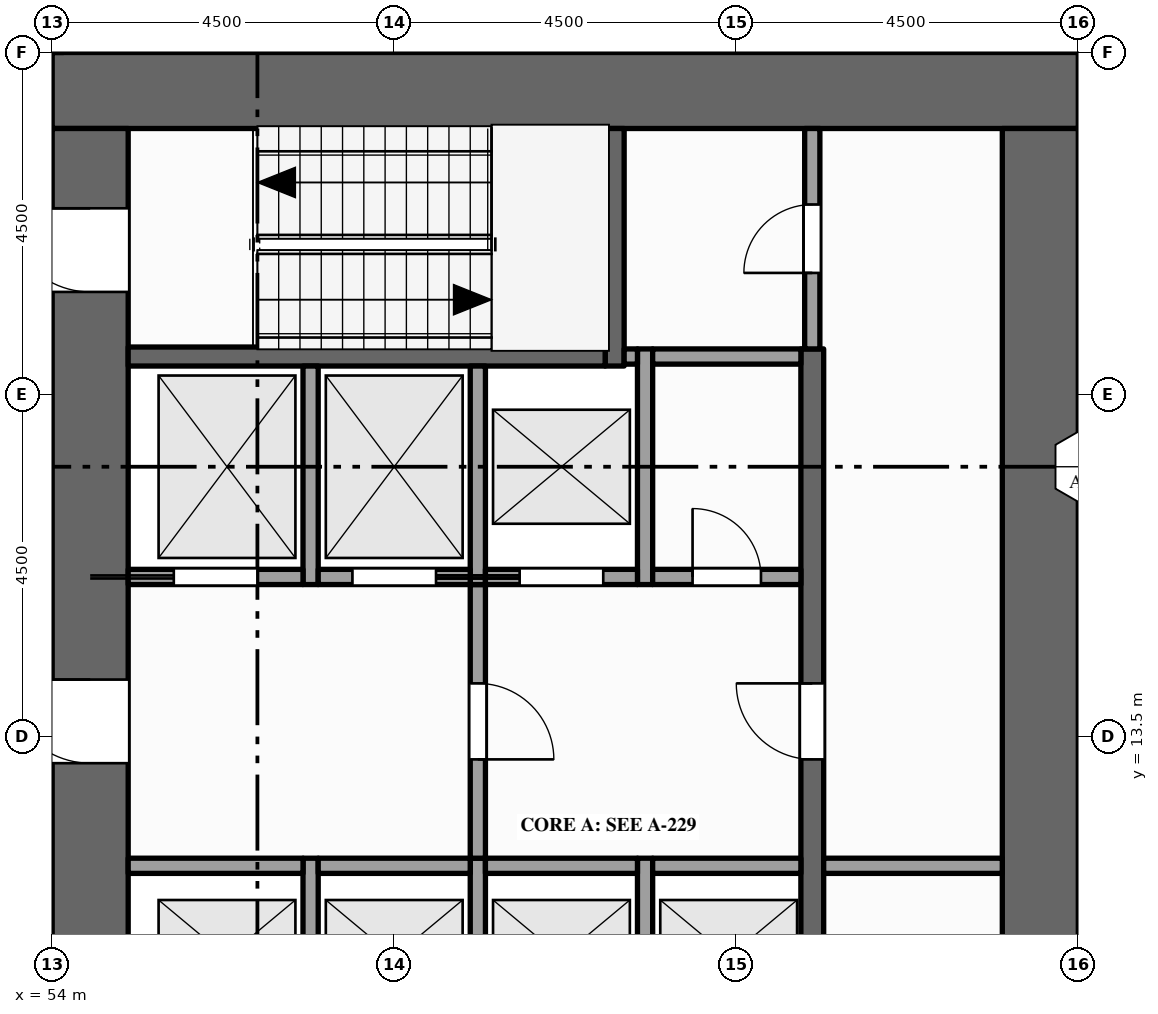
"""IFC4 building model, lengths in metres.
Left out: names, types, materials, properties, quantities, classifications, styles, units other than length and angle.
Written with IfcOpenShell. Run it as: python <this file> out.ifc"""

import sys

from ifc_helpers import new_model, si_unit, direction, frame, frame_2d, origin, place, context, subcontext, project, spatial, rectangle, extrude, element, fill, save


model = new_model("IFC4")
c1 = context("Model", 3, precision=1e-05, world=origin(), true_north=direction((0.0, 1.0)))
c2 = subcontext(c1, "Body", "Model", "MODEL_VIEW")
j1 = project(units=[si_unit("LENGTHUNIT", "METRE"), si_unit("PLANEANGLEUNIT", "RADIAN")], contexts=[c1])
p1 = place(None, origin())
s1 = spatial("IfcSite", under=j1, at=p1, CompositionType="ELEMENT")
p2 = place(p1, origin())
s2 = spatial("IfcBuilding", under=s1, at=p2, CompositionType="ELEMENT")
p3 = place(p2, frame((0.0, 0.0, 155.0)))
s3 = spatial("IfcBuildingStorey", under=s2, at=p3, CompositionType="ELEMENT", Elevation=155.0)
p4 = place(p3, frame((54.0, 22.0, -0.15), z_axis=(0.0, 0.0, 1.0), x_axis=(1.0, 0.0, 0.0)))
e1 = element("IfcWall", 1, at=p4, inside=s3, PredefinedType="SHEAR", context=c2, shape_type="SweptSolid", body=[
    extrude(rectangle(XDim=13.5, YDim=1.0, at=frame_2d((6.75, 0.0))), origin(), (0.0, 0.0, 1.0), 4.0),
])
p5 = place(p3, frame((54.5, 1.0, -0.15), z_axis=(0.0, 0.0, 1.0), x_axis=(0.0, 1.0, 0.0)))
e2 = element("IfcWall", 2, at=p5, inside=s3, PredefinedType="SHEAR", context=c2, shape_type="SweptSolid", body=[
    extrude(rectangle(XDim=20.5, YDim=1.0, at=frame_2d((10.25, 0.0))), origin(), (0.0, 0.0, 1.0), 4.0),
])
p6 = place(p5, frame((6.1, 0.0, 0.15)))
e3 = element("IfcOpeningElement", 3, at=p6, cuts=e2, PredefinedType="OPENING", context=c2, shape_type="SweptSolid", body=[
    extrude(rectangle(XDim=1.8, YDim=2.1, at=frame_2d((0.9, 1.05))), frame((0.0, 0.51, 0.0), z_axis=(0.0, -1.0, 0.0), x_axis=(1.0, 0.0, 0.0)), (0.0, 0.0, 1.0), 1.02),
])
p7 = place(p5, frame((12.15, 0.0, 0.15)))
e4 = element("IfcOpeningElement", 4, at=p7, cuts=e2, PredefinedType="OPENING", context=c2, shape_type="SweptSolid", body=[
    extrude(rectangle(XDim=1.1, YDim=2.1, at=frame_2d((0.55, 1.05))), frame((0.0, 0.51, 0.0), z_axis=(0.0, -1.0, 0.0), x_axis=(1.0, 0.0, 0.0)), (0.0, 0.0, 1.0), 1.02),
])
p8 = place(p5, frame((1.15, 0.0, 0.15)))
e5 = element("IfcOpeningElement", 5, at=p8, cuts=e2, PredefinedType="OPENING", context=c2, shape_type="SweptSolid", body=[
    extrude(rectangle(XDim=1.1, YDim=2.1, at=frame_2d((0.55, 1.05))), frame((0.0, 0.51, 0.0), z_axis=(0.0, -1.0, 0.0), x_axis=(1.0, 0.0, 0.0)), (0.0, 0.0, 1.0), 1.02),
])
p9 = place(p5, frame((18.35, 0.0, 0.15)))
e6 = element("IfcOpeningElement", 6, at=p9, cuts=e2, PredefinedType="OPENING", context=c2, shape_type="SweptSolid", body=[
    extrude(rectangle(XDim=1.1, YDim=2.1, at=frame_2d((0.55, 1.05))), frame((0.0, 0.51, 0.0), z_axis=(0.0, -1.0, 0.0), x_axis=(1.0, 0.0, 0.0)), (0.0, 0.0, 1.0), 1.02),
])
p10 = place(p3, frame((67.0, 1.0, -0.15), z_axis=(0.0, 0.0, 1.0), x_axis=(0.0, 1.0, 0.0)))
e7 = element("IfcWall", 7, at=p10, inside=s3, PredefinedType="SHEAR", context=c2, shape_type="SweptSolid", body=[
    extrude(rectangle(XDim=20.5, YDim=1.0, at=frame_2d((10.25, 0.0))), origin(), (0.0, 0.0, 1.0), 4.0),
])
p11 = place(p3, frame((54.0, 22.5, 0.0), z_axis=(0.0, 0.0, 1.0), x_axis=(0.0, 1.0, 0.0)))
e8 = element("IfcWall", 8, at=p11, inside=s3, PredefinedType="STANDARD", context=c2, shape_type="SweptSolid", body=[
    extrude(rectangle(XDim=1.05, YDim=0.3, at=frame_2d((0.525, 0.0))), origin(), (0.0, 0.0, 1.0), 3.149),
])
p12 = place(p3, frame((57.4, 9.3, 0.0), z_axis=(0.0, 0.0, 1.0), x_axis=(0.0, 1.0, 0.0)))
e9 = element("IfcWall", 9, at=p12, inside=s3, PredefinedType="SOLIDWALL", context=c2, shape_type="SweptSolid", body=[
    extrude(rectangle(XDim=2.6, YDim=0.2, at=frame_2d((1.3, 0.0))), origin(), (0.0, 0.0, 1.0), 3.85),
])
p13 = place(p3, frame((57.4, 15.5, 0.0), z_axis=(0.0, 0.0, 1.0), x_axis=(0.0, 1.0, 0.0)))
e10 = element("IfcWall", 10, at=p13, inside=s3, PredefinedType="SOLIDWALL", context=c2, shape_type="SweptSolid", body=[
    extrude(rectangle(XDim=2.875, YDim=0.2, at=frame_2d((1.438, 0.0))), origin(), (0.0, 0.0, 1.0), 3.85),
])
p14 = place(p3, frame((59.6, 9.3, 0.0), z_axis=(0.0, 0.0, 1.0), x_axis=(0.0, 1.0, 0.0)))
e11 = element("IfcWall", 11, at=p14, inside=s3, PredefinedType="SOLIDWALL", context=c2, shape_type="SweptSolid", body=[
    extrude(rectangle(XDim=2.6, YDim=0.2, at=frame_2d((1.3, 0.0))), origin(), (0.0, 0.0, 1.0), 3.85),
])
p15 = place(p3, frame((59.6, 11.9, 0.0), z_axis=(0.0, 0.0, 1.0), x_axis=(0.0, 1.0, 0.0)))
e12 = element("IfcWall", 12, at=p15, inside=s3, PredefinedType="PARTITIONING", context=c2, shape_type="SweptSolid", body=[
    extrude(rectangle(XDim=3.6, YDim=0.2, at=frame_2d((1.8, 0.0))), origin(), (0.0, 0.0, 1.0), 3.85),
])
p16 = place(p15, frame((1.3, 0.0, 0.0)))
e13 = element("IfcOpeningElement", 13, at=p16, cuts=e12, PredefinedType="OPENING", context=c2, shape_type="SweptSolid", body=[
    extrude(rectangle(XDim=1.0, YDim=2.1, at=frame_2d((0.5, 1.05))), frame((0.0, 0.11, 0.0), z_axis=(0.0, -1.0, 0.0), x_axis=(1.0, 0.0, 0.0)), (0.0, 0.0, 1.0), 0.22),
])
p17 = place(p3, frame((59.6, 15.5, 0.0), z_axis=(0.0, 0.0, 1.0), x_axis=(0.0, 1.0, 0.0)))
e14 = element("IfcWall", 14, at=p17, inside=s3, PredefinedType="SOLIDWALL", context=c2, shape_type="SweptSolid", body=[
    extrude(rectangle(XDim=2.875, YDim=0.2, at=frame_2d((1.438, 0.0))), origin(), (0.0, 0.0, 1.0), 3.85),
])
p18 = place(p3, frame((61.4, 18.375, 0.0), z_axis=(0.0, 0.0, 1.0), x_axis=(0.0, 1.0, 0.0)))
e15 = element("IfcWall", 15, at=p18, inside=s3, PredefinedType="SHEAR", context=c2, shape_type="SweptSolid", body=[
    extrude(rectangle(XDim=3.125, YDim=0.25, at=frame_2d((1.562, 0.0))), origin(), (0.0, 0.0, 1.0), 3.85),
])
p19 = place(p3, frame((61.8, 9.3, 0.0), z_axis=(0.0, 0.0, 1.0), x_axis=(0.0, 1.0, 0.0)))
e16 = element("IfcWall", 16, at=p19, inside=s3, PredefinedType="SOLIDWALL", context=c2, shape_type="SweptSolid", body=[
    extrude(rectangle(XDim=2.6, YDim=0.2, at=frame_2d((1.3, 0.0))), origin(), (0.0, 0.0, 1.0), 3.85),
])
p20 = place(p3, frame((61.8, 15.5, 0.0), z_axis=(0.0, 0.0, 1.0), x_axis=(0.0, 1.0, 0.0)))
e17 = element("IfcWall", 17, at=p20, inside=s3, PredefinedType="SOLIDWALL", context=c2, shape_type="SweptSolid", body=[
    extrude(rectangle(XDim=3.1, YDim=0.2, at=frame_2d((1.55, 0.0))), origin(), (0.0, 0.0, 1.0), 3.85),
])
p21 = place(p3, frame((64.0, 4.1, 0.0), z_axis=(0.0, 0.0, 1.0), x_axis=(0.0, 1.0, 0.0)))
e18 = element("IfcWall", 18, at=p21, inside=s3, PredefinedType="SHEAR", context=c2, shape_type="SweptSolid", body=[
    extrude(rectangle(XDim=14.5, YDim=0.3, at=frame_2d((7.25, 0.0))), origin(), (0.0, 0.0, 1.0), 3.85),
])
p22 = place(p21, frame((3.4, 0.0, 0.0)))
e19 = element("IfcOpeningElement", 19, at=p22, cuts=e18, PredefinedType="OPENING", context=c2, shape_type="SweptSolid", body=[
    extrude(rectangle(XDim=1.0, YDim=2.1, at=frame_2d((0.5, 1.05))), frame((0.0, 0.16, 0.0), z_axis=(0.0, -1.0, 0.0), x_axis=(1.0, 0.0, 0.0)), (0.0, 0.0, 1.0), 0.32),
])
p23 = place(p21, frame((9.1, 0.0, 0.0)))
e20 = element("IfcOpeningElement", 20, at=p23, cuts=e18, PredefinedType="OPENING", context=c2, shape_type="SweptSolid", body=[
    extrude(rectangle(XDim=1.0, YDim=2.1, at=frame_2d((0.5, 1.05))), frame((0.0, 0.16, 0.0), z_axis=(0.0, -1.0, 0.0), x_axis=(1.0, 0.0, 0.0)), (0.0, 0.0, 1.0), 0.32),
])
p24 = place(p3, frame((64.0, 18.6, 0.0), z_axis=(0.0, 0.0, 1.0), x_axis=(0.0, 1.0, 0.0)))
e21 = element("IfcWall", 21, at=p24, inside=s3, PredefinedType="PARTITIONING", context=c2, shape_type="SweptSolid", body=[
    extrude(rectangle(XDim=2.9, YDim=0.2, at=frame_2d((1.45, 0.0))), origin(), (0.0, 0.0, 1.0), 3.85),
])
p25 = place(p24, frame((1.0, 0.0, 0.0)))
e22 = element("IfcOpeningElement", 22, at=p25, cuts=e21, PredefinedType="OPENING", context=c2, shape_type="SweptSolid", body=[
    extrude(rectangle(XDim=0.9, YDim=2.1, at=frame_2d((0.45, 1.05))), frame((0.0, 0.11, 0.0), z_axis=(0.0, -1.0, 0.0), x_axis=(1.0, 0.0, 0.0)), (0.0, 0.0, 1.0), 0.22),
])
p26 = place(p3, frame((55.0, 11.8, 0.0), z_axis=(0.0, 0.0, 1.0), x_axis=(1.0, 0.0, 0.0)))
e23 = element("IfcWall", 23, at=p26, inside=s3, PredefinedType="SOLIDWALL", context=c2, shape_type="SweptSolid", body=[
    extrude(rectangle(XDim=2.3, YDim=0.2, at=frame_2d((1.15, 0.0))), origin(), (0.0, 0.0, 1.0), 3.85),
])
for number, where, z_axis, x_axis in (
    (24, (57.5, 11.8, 0.0), (0.0, 0.0, 1.0), (1.0, 0.0, 0.0)),
    (25, (59.7, 11.8, 0.0), (0.0, 0.0, 1.0), (1.0, 0.0, 0.0)),
):
    element("IfcWall", number, at=place(p3, frame(where, z_axis=z_axis, x_axis=x_axis)), inside=s3, PredefinedType="SOLIDWALL", context=c2, shape_type="SweptSolid", body=[
        extrude(rectangle(XDim=2.0, YDim=0.2, at=frame_2d((1.0, 0.0))), origin(), (0.0, 0.0, 1.0), 3.85),
    ])
p27 = place(p3, frame((61.9, 11.8, 0.0), z_axis=(0.0, 0.0, 1.0), x_axis=(1.0, 0.0, 0.0)))
e26 = element("IfcWall", 26, at=p27, inside=s3, PredefinedType="SOLIDWALL", context=c2, shape_type="SweptSolid", body=[
    extrude(rectangle(XDim=1.95, YDim=0.2, at=frame_2d((0.975, 0.0))), origin(), (0.0, 0.0, 1.0), 3.85),
])
p28 = place(p3, frame((64.15, 11.8, 0.0), z_axis=(0.0, 0.0, 1.0), x_axis=(1.0, 0.0, 0.0)))
e27 = element("IfcWall", 27, at=p28, inside=s3, PredefinedType="PARTITIONING", context=c2, shape_type="SweptSolid", body=[
    extrude(rectangle(XDim=2.35, YDim=0.2, at=frame_2d((1.175, 0.0))), origin(), (0.0, 0.0, 1.0), 3.85),
])
p29 = place(p3, frame((55.0, 15.6, 0.0), z_axis=(0.0, 0.0, 1.0), x_axis=(1.0, 0.0, 0.0)))
e28 = element("IfcWall", 28, at=p29, inside=s3, PredefinedType="SOLIDWALL", context=c2, shape_type="SweptSolid", body=[
    extrude(rectangle(XDim=2.3, YDim=0.2, at=frame_2d((1.15, 0.0))), origin(), (0.0, 0.0, 1.0), 3.85),
])
p30 = place(p29, frame((0.6, 0.0, 0.012)))
e29 = element("IfcOpeningElement", 29, at=p30, cuts=e28, PredefinedType="OPENING", context=c2, shape_type="SweptSolid", body=[
    extrude(rectangle(XDim=1.1, YDim=2.1, at=frame_2d((0.55, 1.05))), frame((0.0, 0.11, 0.0), z_axis=(0.0, -1.0, 0.0), x_axis=(1.0, 0.0, 0.0)), (0.0, 0.0, 1.0), 0.22),
])
p31 = place(p3, frame((57.5, 15.6, 0.0), z_axis=(0.0, 0.0, 1.0), x_axis=(1.0, 0.0, 0.0)))
e30 = element("IfcWall", 30, at=p31, inside=s3, PredefinedType="SOLIDWALL", context=c2, shape_type="SweptSolid", body=[
    extrude(rectangle(XDim=2.0, YDim=0.2, at=frame_2d((1.0, 0.0))), origin(), (0.0, 0.0, 1.0), 3.85),
])
p32 = place(p31, frame((0.45, 0.0, 0.012)))
e31 = element("IfcOpeningElement", 31, at=p32, cuts=e30, PredefinedType="OPENING", context=c2, shape_type="SweptSolid", body=[
    extrude(rectangle(XDim=1.1, YDim=2.1, at=frame_2d((0.55, 1.05))), frame((0.0, 0.11, 0.0), z_axis=(0.0, -1.0, 0.0), x_axis=(1.0, 0.0, 0.0)), (0.0, 0.0, 1.0), 0.22),
])
p33 = place(p3, frame((59.7, 15.6, 0.0), z_axis=(0.0, 0.0, 1.0), x_axis=(1.0, 0.0, 0.0)))
e32 = element("IfcWall", 32, at=p33, inside=s3, PredefinedType="SOLIDWALL", context=c2, shape_type="SweptSolid", body=[
    extrude(rectangle(XDim=2.0, YDim=0.2, at=frame_2d((1.0, 0.0))), origin(), (0.0, 0.0, 1.0), 3.85),
])
p34 = place(p33, frame((0.45, 0.0, 0.012)))
e33 = element("IfcOpeningElement", 33, at=p34, cuts=e32, PredefinedType="OPENING", context=c2, shape_type="SweptSolid", body=[
    extrude(rectangle(XDim=1.1, YDim=2.1, at=frame_2d((0.55, 1.05))), frame((0.0, 0.11, 0.0), z_axis=(0.0, -1.0, 0.0), x_axis=(1.0, 0.0, 0.0)), (0.0, 0.0, 1.0), 0.22),
])
p35 = place(p3, frame((61.9, 15.6, 0.0), z_axis=(0.0, 0.0, 1.0), x_axis=(1.0, 0.0, 0.0)))
e34 = element("IfcWall", 34, at=p35, inside=s3, PredefinedType="PARTITIONING", context=c2, shape_type="SweptSolid", body=[
    extrude(rectangle(XDim=1.95, YDim=0.2, at=frame_2d((0.975, 0.0))), origin(), (0.0, 0.0, 1.0), 3.85),
])
p36 = place(p35, frame((0.525, 0.0, 0.0)))
e35 = element("IfcOpeningElement", 35, at=p36, cuts=e34, PredefinedType="OPENING", context=c2, shape_type="SweptSolid", body=[
    extrude(rectangle(XDim=0.9, YDim=2.1, at=frame_2d((0.45, 1.05))), frame((0.0, 0.11, 0.0), z_axis=(0.0, -1.0, 0.0), x_axis=(1.0, 0.0, 0.0)), (0.0, 0.0, 1.0), 0.22),
])
p37 = place(p3, frame((55.0, 18.5, 0.0), z_axis=(0.0, 0.0, 1.0), x_axis=(1.0, 0.0, 0.0)))
e36 = element("IfcWall", 36, at=p37, inside=s3, PredefinedType="SHEAR", context=c2, shape_type="SweptSolid", body=[
    extrude(rectangle(XDim=6.275, YDim=0.25, at=frame_2d((3.137, 0.0))), origin(), (0.0, 0.0, 1.0), 3.85),
])
p38 = place(p3, frame((61.525, 18.5, 0.0), z_axis=(0.0, 0.0, 1.0), x_axis=(1.0, 0.0, 0.0)))
e37 = element("IfcWall", 37, at=p38, inside=s3, PredefinedType="SOLIDWALL", context=c2, shape_type="SweptSolid", body=[
    extrude(rectangle(XDim=0.175, YDim=0.2, at=frame_2d((0.087, 0.0))), origin(), (0.0, 0.0, 1.0), 3.85),
])
p39 = place(p3, frame((61.9, 18.5, 0.0), z_axis=(0.0, 0.0, 1.0), x_axis=(1.0, 0.0, 0.0)))
e38 = element("IfcWall", 38, at=p39, inside=s3, PredefinedType="PARTITIONING", context=c2, shape_type="SweptSolid", body=[
    extrude(rectangle(XDim=1.95, YDim=0.2, at=frame_2d((0.975, 0.0))), origin(), (0.0, 0.0, 1.0), 3.85),
])
p40 = place(p30, origin())
e39 = element("IfcDoor", 39, at=p40, inside=s3, OperationType="SLIDING_TO_LEFT", PredefinedType="DOOR", context=c2, shape_type="SweptSolid", body=[
    extrude(rectangle(XDim=1.1, YDim=2.1, at=frame_2d((0.55, 1.05))), frame((0.0, 0.025, 0.0), z_axis=(0.0, -1.0, 0.0), x_axis=(1.0, 0.0, 0.0)), (0.0, 0.0, 1.0), 0.05),
])
fill(e29, e39)
p41 = place(p32, origin())
e40 = element("IfcDoor", 40, at=p41, inside=s3, OperationType="SLIDING_TO_RIGHT", PredefinedType="DOOR", context=c2, shape_type="SweptSolid", body=[
    extrude(rectangle(XDim=1.1, YDim=2.1, at=frame_2d((0.55, 1.05))), frame((0.0, 0.025, 0.0), z_axis=(0.0, -1.0, 0.0), x_axis=(1.0, 0.0, 0.0)), (0.0, 0.0, 1.0), 0.05),
])
fill(e31, e40)
p42 = place(p34, origin())
e41 = element("IfcDoor", 41, at=p42, inside=s3, OperationType="SLIDING_TO_LEFT", PredefinedType="DOOR", context=c2, shape_type="SweptSolid", body=[
    extrude(rectangle(XDim=1.1, YDim=2.1, at=frame_2d((0.55, 1.05))), frame((0.0, 0.025, 0.0), z_axis=(0.0, -1.0, 0.0), x_axis=(1.0, 0.0, 0.0)), (0.0, 0.0, 1.0), 0.05),
])
fill(e33, e41)
p43 = place(p7, origin())
e42 = element("IfcDoor", 42, at=p43, inside=s3, OperationType="SINGLE_SWING_RIGHT", PredefinedType="DOOR", context=c2, shape_type="SweptSolid", body=[
    extrude(rectangle(XDim=1.1, YDim=2.1, at=frame_2d((0.55, 1.05))), frame((0.0, 0.025, 0.0), z_axis=(0.0, -1.0, 0.0), x_axis=(1.0, 0.0, 0.0)), (0.0, 0.0, 1.0), 0.05),
])
fill(e4, e42)
p44 = place(p16, origin())
e43 = element("IfcDoor", 43, at=p44, inside=s3, OperationType="SINGLE_SWING_LEFT", PredefinedType="DOOR", context=c2, shape_type="SweptSolid", body=[
    extrude(rectangle(XDim=1.0, YDim=2.1, at=frame_2d((0.5, 1.05))), frame((0.0, 0.025, 0.0), z_axis=(0.0, -1.0, 0.0), x_axis=(1.0, 0.0, 0.0)), (0.0, 0.0, 1.0), 0.05),
])
fill(e13, e43)
p45 = place(p23, origin())
e44 = element("IfcDoor", 44, at=p45, inside=s3, OperationType="SINGLE_SWING_RIGHT", PredefinedType="DOOR", context=c2, shape_type="SweptSolid", body=[
    extrude(rectangle(XDim=1.0, YDim=2.1, at=frame_2d((0.5, 1.05))), frame((0.0, 0.025, 0.0), z_axis=(0.0, -1.0, 0.0), x_axis=(1.0, 0.0, 0.0)), (0.0, 0.0, 1.0), 0.05),
])
fill(e20, e44)
p46 = place(p9, origin())
e45 = element("IfcDoor", 45, at=p46, inside=s3, OperationType="SINGLE_SWING_RIGHT", PredefinedType="DOOR", context=c2, shape_type="SweptSolid", body=[
    extrude(rectangle(XDim=1.1, YDim=2.1, at=frame_2d((0.55, 1.05))), frame((0.0, 0.025, 0.0), z_axis=(0.0, -1.0, 0.0), x_axis=(1.0, 0.0, 0.0)), (0.0, 0.0, 1.0), 0.05),
])
fill(e6, e45)
p47 = place(p25, origin())
e46 = element("IfcDoor", 46, at=p47, inside=s3, OperationType="SINGLE_SWING_LEFT", PredefinedType="DOOR", context=c2, shape_type="SweptSolid", body=[
    extrude(rectangle(XDim=0.9, YDim=2.1, at=frame_2d((0.45, 1.05))), frame((0.0, 0.025, 0.0), z_axis=(0.0, -1.0, 0.0), x_axis=(1.0, 0.0, 0.0)), (0.0, 0.0, 1.0), 0.05),
])
fill(e22, e46)
p48 = place(p36, origin())
e47 = element("IfcDoor", 47, at=p48, inside=s3, OperationType="SINGLE_SWING_LEFT", PredefinedType="DOOR", context=c2, shape_type="SweptSolid", body=[
    extrude(rectangle(XDim=0.9, YDim=2.1, at=frame_2d((0.45, 1.05))), frame((0.0, 0.025, 0.0), z_axis=(0.0, -1.0, 0.0), x_axis=(1.0, 0.0, 0.0)), (0.0, 0.0, 1.0), 0.05),
])
fill(e35, e47)
save(model, sys.argv[1])
